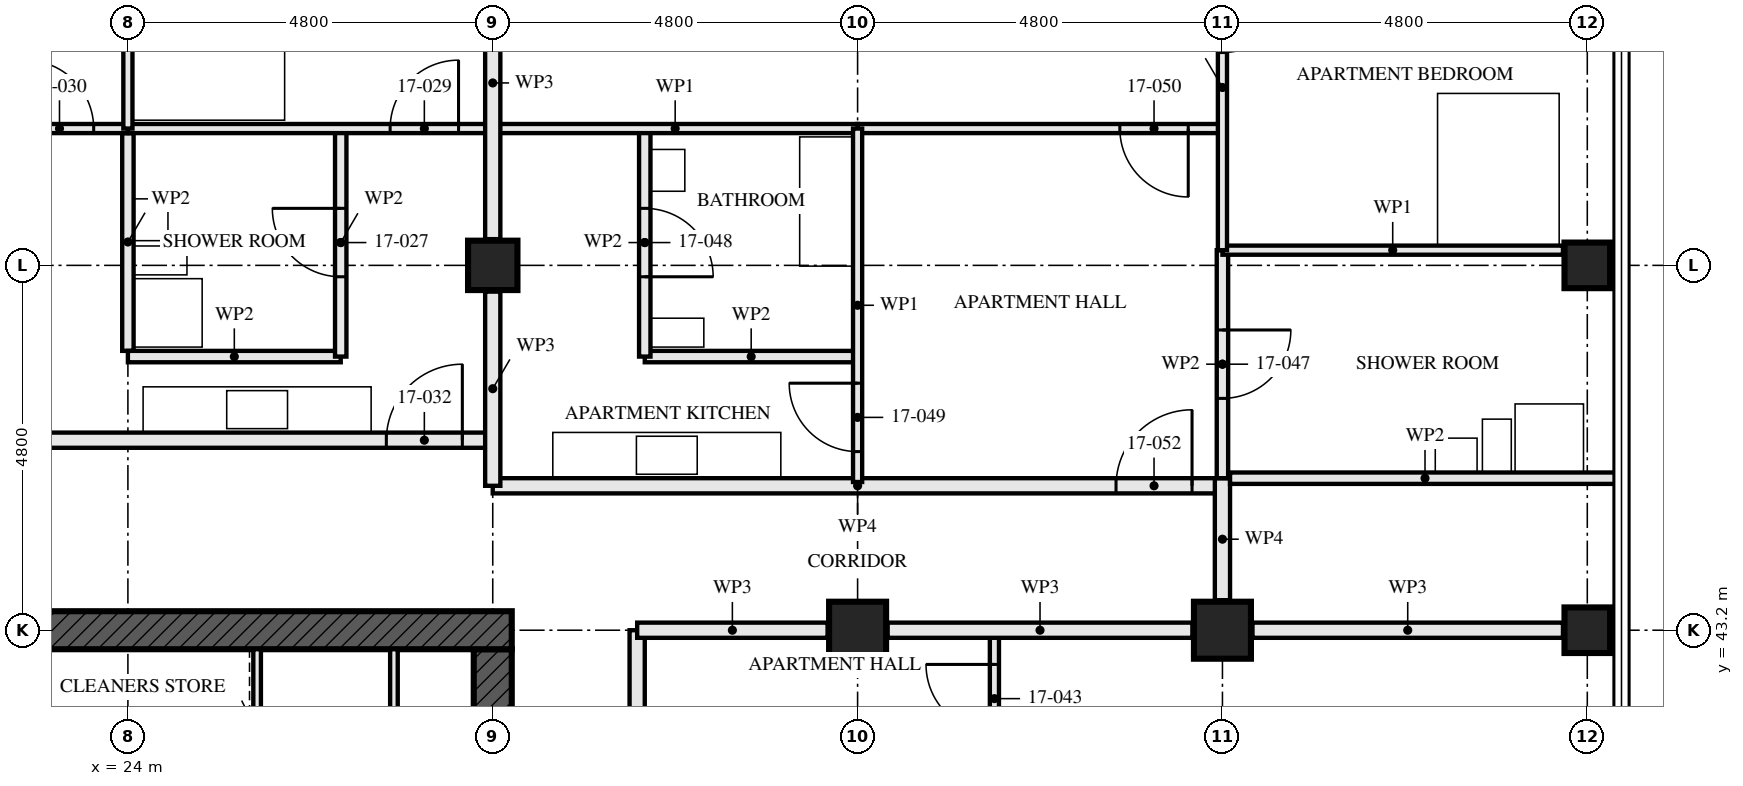
"""IFC4 building model, lengths in metres.
Left out: names, types, materials, properties, quantities, classifications, styles, units other than length and angle.
Written with IfcOpenShell. Run it as: python <this file> out.ifc"""

import sys

from ifc_helpers import new_model, si_unit, direction, frame, frame_2d, origin, origin_2d, place, context, subcontext, project, spatial, rectangle, hollow_rectangle, extrude, element, fill, save


model = new_model("IFC4")
c1 = context("Model", 3, precision=1e-05, world=origin(), true_north=direction((0.0, 1.0)))
c2 = subcontext(c1, "Body", "Model", "MODEL_VIEW")
j1 = project(units=[si_unit("LENGTHUNIT", "METRE"), si_unit("PLANEANGLEUNIT", "RADIAN")], contexts=[c1])
p1 = place(None, origin())
s1 = spatial("IfcSite", under=j1, at=p1, CompositionType="ELEMENT")
p2 = place(p1, origin())
s2 = spatial("IfcBuilding", under=s1, at=p2, CompositionType="ELEMENT")
p3 = place(p2, frame((0.0, 0.0, 65.5)))
s3 = spatial("IfcBuildingStorey", under=s2, at=p3, CompositionType="ELEMENT", Elevation=65.5)
p4 = place(p3, frame((28.8, 48.0, 0.0), z_axis=(0.0, 0.0, 1.0), x_axis=(1.0, 0.0, 0.0)))
e1 = element("IfcColumn", 1, at=p4, inside=s3, PredefinedType="COLUMN", context=c2, shape_type="SweptSolid", body=[
    extrude(hollow_rectangle(XDim=0.65, YDim=0.65, WallThickness=0.05, at=origin_2d()), origin(), (0.0, 0.0, 1.0), 3.5),
])
for number, where, z_axis, x_axis in (
    (2, (33.6, 43.2, 0.0), (0.0, 0.0, 1.0), (0.0, 1.0, 0.0)),
    (3, (38.4, 43.2, 0.0), (0.0, 0.0, 1.0), (0.0, 1.0, 0.0)),
):
    element("IfcColumn", number, at=place(p3, frame(where, z_axis=z_axis, x_axis=x_axis)), inside=s3, PredefinedType="COLUMN", context=c2, shape_type="SweptSolid", body=[
        extrude(hollow_rectangle(XDim=0.75, YDim=0.75, WallThickness=0.08, at=origin_2d()), origin(), (0.0, 0.0, 1.0), 3.5),
    ])
for number, where, z_axis, x_axis in (
    (4, (43.2, 43.2, 0.0), (0.0, 0.0, 1.0), (0.0, 1.0, 0.0)),
    (5, (43.2, 48.0, 0.0), (0.0, 0.0, 1.0), (1.0, 0.0, 0.0)),
):
    element("IfcColumn", number, at=place(p3, frame(where, z_axis=z_axis, x_axis=x_axis)), inside=s3, PredefinedType="COLUMN", context=c2, shape_type="SweptSolid", body=[
        extrude(hollow_rectangle(XDim=0.6, YDim=0.6, WallThickness=0.08, at=origin_2d()), origin(), (0.0, 0.0, 1.0), 3.5),
    ])
p5 = place(p3, frame((29.05, 43.2, -0.17), z_axis=(0.0, 0.0, 1.0), x_axis=(-1.0, 0.0, 0.0)))
e6 = element("IfcWall", 6, at=p5, inside=s3, PredefinedType="SHEAR", context=c2, shape_type="SweptSolid", body=[
    extrude(rectangle(XDim=14.9, YDim=0.5, at=frame_2d((7.45, 0.0))), origin(), (0.0, 0.0, 1.0), 3.5),
])
p6 = place(p5, frame((6.85, 0.0, 0.17)))
e7 = element("IfcOpeningElement", 7, at=p6, cuts=e6, PredefinedType="OPENING", context=c2, shape_type="SweptSolid", body=[
    extrude(rectangle(XDim=1.2, YDim=2.1, at=frame_2d((0.6, 1.05))), frame((0.0, 0.26, 0.0), z_axis=(0.0, -1.0, 0.0), x_axis=(1.0, 0.0, 0.0)), (0.0, 0.0, 1.0), 0.521),
])
p7 = place(p3, frame((28.8, 29.05, -0.17), z_axis=(0.0, 0.0, 1.0), x_axis=(0.0, 1.0, 0.0)))
e8 = element("IfcWall", 8, at=p7, inside=s3, PredefinedType="SHEAR", context=c2, shape_type="SweptSolid", body=[
    extrude(rectangle(XDim=13.9, YDim=0.5, at=frame_2d((6.95, 0.0))), origin(), (0.0, 0.0, 1.0), 3.5),
])
p8 = place(p7, frame((6.35, 0.0, 0.17)))
e9 = element("IfcOpeningElement", 9, at=p8, cuts=e8, PredefinedType="OPENING", context=c2, shape_type="SweptSolid", body=[
    extrude(rectangle(XDim=1.2, YDim=2.1, at=frame_2d((0.6, 1.05))), frame((0.0, 0.26, 0.0), z_axis=(0.0, -1.0, 0.0), x_axis=(1.0, 0.0, 0.0)), (0.0, 0.0, 1.0), 0.521),
])
p9 = place(p3, frame((26.8, 49.8, 0.0), z_axis=(0.0, 0.0, 1.0), x_axis=(0.0, -1.0, 0.0)))
e10 = element("IfcWall", 10, at=p9, inside=s3, PredefinedType="PARTITIONING", context=c2, shape_type="SweptSolid", body=[
    extrude(rectangle(XDim=3.0, YDim=0.15, at=frame_2d((1.5, 0.0))), origin(), (0.0, 0.0, 1.0), 2.55),
])
p10 = place(p9, frame((1.05, 0.0, 0.0)))
e11 = element("IfcOpeningElement", 11, at=p10, cuts=e10, PredefinedType="OPENING", context=c2, shape_type="SweptSolid", body=[
    extrude(rectangle(XDim=0.9, YDim=2.1, at=frame_2d((0.45, 1.05))), frame((0.0, 0.085, 0.0), z_axis=(0.0, -1.0, 0.0), x_axis=(1.0, 0.0, 0.0)), (0.0, 0.0, 1.0), 0.171),
])
p11 = place(p3, frame((26.8, 46.8, 0.0), z_axis=(0.0, 0.0, 1.0), x_axis=(-1.0, 0.0, 0.0)))
e12 = element("IfcWall", 12, at=p11, inside=s3, PredefinedType="PARTITIONING", context=c2, shape_type="SweptSolid", body=[
    extrude(rectangle(XDim=2.8, YDim=0.15, at=frame_2d((1.4, 0.0))), origin(), (0.0, 0.0, 1.0), 3.33),
])
p12 = place(p3, frame((28.8, 49.8, 0.0), z_axis=(0.0, 0.0, 1.0), x_axis=(-1.0, 0.0, 0.0)))
e13 = element("IfcWall", 13, at=p12, inside=s3, PredefinedType="PARTITIONING", context=c2, shape_type="SweptSolid", body=[
    extrude(rectangle(XDim=4.8, YDim=0.12, at=frame_2d((2.4, 0.0))), origin(), (0.0, 0.0, 1.0), 3.33),
])
p13 = place(p12, frame((0.45, 0.0, 0.0)))
e14 = element("IfcOpeningElement", 14, at=p13, cuts=e13, PredefinedType="OPENING", context=c2, shape_type="SweptSolid", body=[
    extrude(rectangle(XDim=0.9, YDim=2.1, at=frame_2d((0.45, 1.05))), frame((0.0, 0.071, 0.0), z_axis=(0.0, -1.0, 0.0), x_axis=(1.0, 0.0, 0.0)), (0.0, 0.0, 1.0), 0.141),
])
p14 = place(p3, frame((24.0, 49.8, 0.0), z_axis=(0.0, 0.0, 1.0), x_axis=(-1.0, 0.0, 0.0)))
e15 = element("IfcWall", 15, at=p14, inside=s3, PredefinedType="PARTITIONING", context=c2, shape_type="SweptSolid", body=[
    extrude(rectangle(XDim=4.8, YDim=0.12, at=frame_2d((2.4, 0.0))), origin(), (0.0, 0.0, 1.0), 3.33),
])
p15 = place(p14, frame((0.45, 0.0, 0.0)))
e16 = element("IfcOpeningElement", 16, at=p15, cuts=e15, PredefinedType="OPENING", context=c2, shape_type="SweptSolid", body=[
    extrude(rectangle(XDim=0.9, YDim=2.1, at=frame_2d((0.45, 1.05))), frame((0.0, 0.071, 0.0), z_axis=(0.0, -1.0, 0.0), x_axis=(1.0, 0.0, 0.0)), (0.0, 0.0, 1.0), 0.141),
])
p16 = place(p3, frame((24.0, 57.28, 0.0), z_axis=(0.0, 0.0, 1.0), x_axis=(0.0, -1.0, 0.0)))
e17 = element("IfcWall", 17, at=p16, inside=s3, PredefinedType="PARTITIONING", context=c2, shape_type="SweptSolid", body=[
    extrude(rectangle(XDim=7.48, YDim=0.12, at=frame_2d((3.74, 0.0))), origin(), (0.0, 0.0, 1.0), 2.55),
])
p17 = place(p3, frame((28.8, 45.7, 0.0), z_axis=(0.0, 0.0, 1.0), x_axis=(-1.0, 0.0, 0.0)))
e18 = element("IfcWall", 18, at=p17, inside=s3, PredefinedType="PARTITIONING", context=c2, shape_type="SweptSolid", body=[
    extrude(rectangle(XDim=14.4, YDim=0.2, at=frame_2d((7.2, 0.0))), origin(), (0.0, 0.0, 1.0), 3.33),
])
p18 = place(p17, frame((0.4, 0.0, 0.0)))
e19 = element("IfcOpeningElement", 19, at=p18, cuts=e18, PredefinedType="OPENING", context=c2, shape_type="SweptSolid", body=[
    extrude(rectangle(XDim=1.0, YDim=2.1, at=frame_2d((0.5, 1.05))), frame((0.0, 0.111, 0.0), z_axis=(0.0, -1.0, 0.0), x_axis=(1.0, 0.0, 0.0)), (0.0, 0.0, 1.0), 0.221),
])
p19 = place(p3, frame((35.4, 38.4, 0.0), z_axis=(0.0, 0.0, 1.0), x_axis=(0.0, 1.0, 0.0)))
e20 = element("IfcWall", 20, at=p19, inside=s3, PredefinedType="PARTITIONING", context=c2, shape_type="SweptSolid", body=[
    extrude(rectangle(XDim=4.8, YDim=0.12, at=frame_2d((2.4, 0.0))), origin(), (0.0, 0.0, 1.0), 3.33),
])
p20 = place(p19, frame((3.45, 0.0, 0.0)))
e21 = element("IfcOpeningElement", 21, at=p20, cuts=e20, PredefinedType="OPENING", context=c2, shape_type="SweptSolid", body=[
    extrude(rectangle(XDim=0.9, YDim=2.1, at=frame_2d((0.45, 1.05))), frame((0.0, 0.071, 0.0), z_axis=(0.0, -1.0, 0.0), x_axis=(1.0, 0.0, 0.0)), (0.0, 0.0, 1.0), 0.141),
])
p21 = place(p3, frame((30.7, 28.8, 0.0), z_axis=(0.0, 0.0, 1.0), x_axis=(0.0, 1.0, 0.0)))
e22 = element("IfcWall", 22, at=p21, inside=s3, PredefinedType="PARTITIONING", context=c2, shape_type="SweptSolid", body=[
    extrude(rectangle(XDim=14.4, YDim=0.2, at=frame_2d((7.2, 0.0))), origin(), (0.0, 0.0, 1.0), 2.55),
])
p22 = place(p21, frame((1.4, 0.0, 0.0)))
e23 = element("IfcOpeningElement", 23, at=p22, cuts=e22, PredefinedType="OPENING", context=c2, shape_type="SweptSolid", body=[
    extrude(rectangle(XDim=1.0, YDim=2.1, at=frame_2d((0.5, 1.05))), frame((0.0, 0.111, 0.0), z_axis=(0.0, -1.0, 0.0), x_axis=(1.0, 0.0, 0.0)), (0.0, 0.0, 1.0), 0.221),
])
p23 = place(p21, frame((4.1, 0.0, 0.0)))
e24 = element("IfcOpeningElement", 24, at=p23, cuts=e22, PredefinedType="OPENING", context=c2, shape_type="SweptSolid", body=[
    extrude(rectangle(XDim=1.0, YDim=2.1, at=frame_2d((0.5, 1.05))), frame((0.0, 0.111, 0.0), z_axis=(0.0, -1.0, 0.0), x_axis=(1.0, 0.0, 0.0)), (0.0, 0.0, 1.0), 0.221),
])
p24 = place(p21, frame((10.0, 0.0, 0.0)))
e25 = element("IfcOpeningElement", 25, at=p24, cuts=e22, PredefinedType="OPENING", context=c2, shape_type="SweptSolid", body=[
    extrude(rectangle(XDim=1.0, YDim=2.1, at=frame_2d((0.5, 1.05))), frame((0.0, 0.111, 0.0), z_axis=(0.0, -1.0, 0.0), x_axis=(1.0, 0.0, 0.0)), (0.0, 0.0, 1.0), 0.221),
])
p25 = place(p3, frame((38.4, 48.2, 0.0), z_axis=(0.0, 0.0, 1.0), x_axis=(0.0, -1.0, 0.0)))
e26 = element("IfcWall", 26, at=p25, inside=s3, PredefinedType="PARTITIONING", context=c2, shape_type="SweptSolid", body=[
    extrude(rectangle(XDim=3.0, YDim=0.15, at=frame_2d((1.5, 0.0))), origin(), (0.0, 0.0, 1.0), 2.55),
])
p26 = place(p25, frame((1.05, 0.0, 0.0)))
e27 = element("IfcOpeningElement", 27, at=p26, cuts=e26, PredefinedType="OPENING", context=c2, shape_type="SweptSolid", body=[
    extrude(rectangle(XDim=0.9, YDim=2.1, at=frame_2d((0.45, 1.05))), frame((0.0, 0.085, 0.0), z_axis=(0.0, -1.0, 0.0), x_axis=(1.0, 0.0, 0.0)), (0.0, 0.0, 1.0), 0.171),
])
p27 = place(p3, frame((30.8, 49.8, 0.0), z_axis=(0.0, 0.0, 1.0), x_axis=(0.0, -1.0, 0.0)))
e28 = element("IfcWall", 28, at=p27, inside=s3, PredefinedType="PARTITIONING", context=c2, shape_type="SweptSolid", body=[
    extrude(rectangle(XDim=3.0, YDim=0.15, at=frame_2d((1.5, 0.0))), origin(), (0.0, 0.0, 1.0), 2.55),
])
p28 = place(p27, frame((1.05, 0.0, 0.0)))
e29 = element("IfcOpeningElement", 29, at=p28, cuts=e28, PredefinedType="OPENING", context=c2, shape_type="SweptSolid", body=[
    extrude(rectangle(XDim=0.9, YDim=2.1, at=frame_2d((0.45, 1.05))), frame((0.0, 0.085, 0.0), z_axis=(0.0, -1.0, 0.0), x_axis=(1.0, 0.0, 0.0)), (0.0, 0.0, 1.0), 0.171),
])
p29 = place(p3, frame((33.6, 46.8, 0.0), z_axis=(0.0, 0.0, 1.0), x_axis=(-1.0, 0.0, 0.0)))
e30 = element("IfcWall", 30, at=p29, inside=s3, PredefinedType="PARTITIONING", context=c2, shape_type="SweptSolid", body=[
    extrude(rectangle(XDim=2.8, YDim=0.15, at=frame_2d((1.4, 0.0))), origin(), (0.0, 0.0, 1.0), 3.33),
])
p30 = place(p3, frame((33.6, 49.8, 0.0), z_axis=(0.0, 0.0, 1.0), x_axis=(0.0, -1.0, 0.0)))
e31 = element("IfcWall", 31, at=p30, inside=s3, PredefinedType="PARTITIONING", context=c2, shape_type="SweptSolid", body=[
    extrude(rectangle(XDim=4.65, YDim=0.12, at=frame_2d((2.325, 0.0))), origin(), (0.0, 0.0, 1.0), 2.55),
])
p31 = place(p30, frame((3.35, 0.0, 0.0)))
e32 = element("IfcOpeningElement", 32, at=p31, cuts=e31, PredefinedType="OPENING", context=c2, shape_type="SweptSolid", body=[
    extrude(rectangle(XDim=0.9, YDim=2.1, at=frame_2d((0.45, 1.05))), frame((0.0, 0.071, 0.0), z_axis=(0.0, -1.0, 0.0), x_axis=(1.0, 0.0, 0.0)), (0.0, 0.0, 1.0), 0.141),
])
p32 = place(p3, frame((42.88, 48.2, 0.0), z_axis=(0.0, 0.0, 1.0), x_axis=(-1.0, 0.0, 0.0)))
e33 = element("IfcWall", 33, at=p32, inside=s3, PredefinedType="PARTITIONING", context=c2, shape_type="SweptSolid", body=[
    extrude(rectangle(XDim=4.48, YDim=0.12, at=frame_2d((2.24, 0.0))), origin(), (0.0, 0.0, 1.0), 3.33),
])
p33 = place(p3, frame((38.4, 49.8, 0.0), z_axis=(0.0, 0.0, 1.0), x_axis=(-1.0, 0.0, 0.0)))
e34 = element("IfcWall", 34, at=p33, inside=s3, PredefinedType="PARTITIONING", context=c2, shape_type="SweptSolid", body=[
    extrude(rectangle(XDim=4.8, YDim=0.12, at=frame_2d((2.4, 0.0))), origin(), (0.0, 0.0, 1.0), 3.33),
])
p34 = place(p33, frame((0.45, 0.0, 0.0)))
e35 = element("IfcOpeningElement", 35, at=p34, cuts=e34, PredefinedType="OPENING", context=c2, shape_type="SweptSolid", body=[
    extrude(rectangle(XDim=0.9, YDim=2.1, at=frame_2d((0.45, 1.05))), frame((0.0, 0.071, 0.0), z_axis=(0.0, -1.0, 0.0), x_axis=(1.0, 0.0, 0.0)), (0.0, 0.0, 1.0), 0.141),
])
p35 = place(p3, frame((33.6, 49.8, 0.0), z_axis=(0.0, 0.0, 1.0), x_axis=(-1.0, 0.0, 0.0)))
e36 = element("IfcWall", 36, at=p35, inside=s3, PredefinedType="PARTITIONING", context=c2, shape_type="SweptSolid", body=[
    extrude(rectangle(XDim=4.8, YDim=0.12, at=frame_2d((2.4, 0.0))), origin(), (0.0, 0.0, 1.0), 3.33),
])
p36 = place(p3, frame((38.4, 52.48, 0.0), z_axis=(0.0, 0.0, 1.0), x_axis=(0.0, -1.0, 0.0)))
e37 = element("IfcWall", 37, at=p36, inside=s3, PredefinedType="PARTITIONING", context=c2, shape_type="SweptSolid", body=[
    extrude(rectangle(XDim=4.28, YDim=0.12, at=frame_2d((2.14, 0.0))), origin(), (0.0, 0.0, 1.0), 3.33),
])
p37 = place(p36, frame((0.78, 0.0, 0.0)))
e38 = element("IfcOpeningElement", 38, at=p37, cuts=e37, PredefinedType="OPENING", context=c2, shape_type="SweptSolid", body=[
    extrude(rectangle(XDim=0.9, YDim=2.1, at=frame_2d((0.45, 1.05))), frame((0.0, 0.071, 0.0), z_axis=(0.0, -1.0, 0.0), x_axis=(1.0, 0.0, 0.0)), (0.0, 0.0, 1.0), 0.141),
])
p38 = place(p3, frame((38.4, 45.1, 0.0), z_axis=(0.0, 0.0, 1.0), x_axis=(-1.0, 0.0, 0.0)))
e39 = element("IfcWall", 39, at=p38, inside=s3, PredefinedType="PARTITIONING", context=c2, shape_type="SweptSolid", body=[
    extrude(rectangle(XDim=9.6, YDim=0.2, at=frame_2d((4.8, 0.0))), origin(), (0.0, 0.0, 1.0), 3.33),
])
p39 = place(p38, frame((0.4, 0.0, 0.0)))
e40 = element("IfcOpeningElement", 40, at=p39, cuts=e39, PredefinedType="OPENING", context=c2, shape_type="SweptSolid", body=[
    extrude(rectangle(XDim=1.0, YDim=2.1, at=frame_2d((0.5, 1.05))), frame((0.0, 0.111, 0.0), z_axis=(0.0, -1.0, 0.0), x_axis=(1.0, 0.0, 0.0)), (0.0, 0.0, 1.0), 0.221),
])
p40 = place(p3, frame((38.4, 45.2, 0.0), z_axis=(0.0, 0.0, 1.0), x_axis=(0.0, -1.0, 0.0)))
e41 = element("IfcWall", 41, at=p40, inside=s3, PredefinedType="PARTITIONING", context=c2, shape_type="SweptSolid", body=[
    extrude(rectangle(XDim=1.605, YDim=0.2, at=frame_2d((0.802, 0.0))), origin(), (0.0, 0.0, 1.0), 3.33),
])
for number, where, z_axis, x_axis in (
    (42, (27.5, 37.15, 0.0), (0.0, 0.0, 1.0), (0.0, 1.0, 0.0)),
    (43, (25.7, 37.15, 0.0), (0.0, 0.0, 1.0), (0.0, 1.0, 0.0)),
):
    element("IfcWall", number, at=place(p3, frame(where, z_axis=z_axis, x_axis=x_axis)), inside=s3, PredefinedType="SOLIDWALL", context=c2, shape_type="SweptSolid", body=[
        extrude(rectangle(XDim=5.8, YDim=0.1, at=frame_2d((2.9, 0.0))), origin(), (0.0, 0.0, 1.0), 3.33),
    ])
p41 = place(p3, frame((28.8, 45.1, 0.0), z_axis=(0.0, 0.0, 1.0), x_axis=(0.0, 1.0, 0.0)))
e44 = element("IfcWall", 44, at=p41, inside=s3, PredefinedType="PARTITIONING", context=c2, shape_type="SweptSolid", body=[
    extrude(rectangle(XDim=2.555, YDim=0.2, at=frame_2d((1.277, 0.0))), origin(), (0.0, 0.0, 1.0), 2.32),
])
p42 = place(p3, frame((28.8, 48.345, 0.0), z_axis=(0.0, 0.0, 1.0), x_axis=(0.0, 1.0, 0.0)))
e45 = element("IfcWall", 45, at=p42, inside=s3, PredefinedType="PARTITIONING", context=c2, shape_type="SweptSolid", body=[
    extrude(rectangle(XDim=4.11, YDim=0.2, at=frame_2d((2.055, 0.0))), origin(), (0.0, 0.0, 1.0), 2.32),
])
p43 = place(p3, frame((42.88, 43.2, 0.0), z_axis=(0.0, 0.0, 1.0), x_axis=(-1.0, 0.0, 0.0)))
e46 = element("IfcWall", 46, at=p43, inside=s3, PredefinedType="PARTITIONING", context=c2, shape_type="SweptSolid", body=[
    extrude(rectangle(XDim=4.085, YDim=0.2, at=frame_2d((2.042, 0.0))), origin(), (0.0, 0.0, 1.0), 2.32),
])
p44 = place(p3, frame((38.005, 43.2, 0.0), z_axis=(0.0, 0.0, 1.0), x_axis=(-1.0, 0.0, 0.0)))
e47 = element("IfcWall", 47, at=p44, inside=s3, PredefinedType="PARTITIONING", context=c2, shape_type="SweptSolid", body=[
    extrude(rectangle(XDim=4.01, YDim=0.2, at=frame_2d((2.005, 0.0))), origin(), (0.0, 0.0, 1.0), 2.32),
])
p45 = place(p3, frame((33.205, 43.2, 0.0), z_axis=(0.0, 0.0, 1.0), x_axis=(-1.0, 0.0, 0.0)))
e48 = element("IfcWall", 48, at=p45, inside=s3, PredefinedType="PARTITIONING", context=c2, shape_type="SweptSolid", body=[
    extrude(rectangle(XDim=2.505, YDim=0.2, at=frame_2d((1.252, 0.0))), origin(), (0.0, 0.0, 1.0), 2.32),
])
p46 = place(p3, frame((24.0, 46.875, 0.0), z_axis=(0.0, 0.0, 1.0), x_axis=(0.0, 1.0, 0.0)))
e49 = element("IfcWall", 49, at=p46, inside=s3, PredefinedType="PARTITIONING", context=c2, shape_type="SweptSolid", body=[
    extrude(rectangle(XDim=2.865, YDim=0.15, at=frame_2d((1.433, 0.0))), origin(), (0.0, 0.0, 1.0), 2.55),
])
p47 = place(p3, frame((43.63, 45.2, 0.0), z_axis=(0.0, 0.0, 1.0), x_axis=(-1.0, 0.0, 0.0)))
e50 = element("IfcWall", 50, at=p47, inside=s3, PredefinedType="PARTITIONING", context=c2, shape_type="SweptSolid", body=[
    extrude(rectangle(XDim=5.13, YDim=0.15, at=frame_2d((2.565, 0.0))), origin(), (0.0, 0.0, 1.0), 2.32),
])
p48 = place(p10, frame((0.9, 0.0, 0.0), z_axis=(0.0, 0.0, 1.0), x_axis=(-1.0, 0.0, 0.0)))
e51 = element("IfcDoor", 51, at=p48, inside=s3, OperationType="SINGLE_SWING_LEFT", PredefinedType="DOOR", context=c2, shape_type="SweptSolid", body=[
    extrude(rectangle(XDim=0.9, YDim=2.1, at=frame_2d((0.45, 1.05))), frame((0.0, 0.022, 0.0), z_axis=(0.0, -1.0, 0.0), x_axis=(1.0, 0.0, 0.0)), (0.0, 0.0, 1.0), 0.044),
])
fill(e11, e51)
p49 = place(p13, frame((0.9, 0.0, 0.0), z_axis=(0.0, 0.0, 1.0), x_axis=(-1.0, 0.0, 0.0)))
e52 = element("IfcDoor", 52, at=p49, inside=s3, OperationType="SINGLE_SWING_LEFT", PredefinedType="DOOR", context=c2, shape_type="SweptSolid", body=[
    extrude(rectangle(XDim=0.9, YDim=2.1, at=frame_2d((0.45, 1.05))), frame((0.0, 0.022, 0.0), z_axis=(0.0, -1.0, 0.0), x_axis=(1.0, 0.0, 0.0)), (0.0, 0.0, 1.0), 0.044),
])
fill(e14, e52)
p50 = place(p15, frame((0.9, 0.0, 0.0), z_axis=(0.0, 0.0, 1.0), x_axis=(-1.0, 0.0, 0.0)))
e53 = element("IfcDoor", 53, at=p50, inside=s3, OperationType="SINGLE_SWING_RIGHT", PredefinedType="DOOR", context=c2, shape_type="SweptSolid", body=[
    extrude(rectangle(XDim=0.9, YDim=2.1, at=frame_2d((0.45, 1.05))), frame((0.0, 0.022, 0.0), z_axis=(0.0, -1.0, 0.0), x_axis=(1.0, 0.0, 0.0)), (0.0, 0.0, 1.0), 0.044),
])
fill(e16, e53)
p51 = place(p18, frame((1.0, 0.0, 0.0), z_axis=(0.0, 0.0, 1.0), x_axis=(-1.0, 0.0, 0.0)))
e54 = element("IfcDoor", 54, at=p51, inside=s3, OperationType="SINGLE_SWING_LEFT", PredefinedType="DOOR", context=c2, shape_type="SweptSolid", body=[
    extrude(rectangle(XDim=1.0, YDim=2.1, at=frame_2d((0.5, 1.05))), frame((0.0, 0.027, 0.0), z_axis=(0.0, -1.0, 0.0), x_axis=(1.0, 0.0, 0.0)), (0.0, 0.0, 1.0), 0.054),
])
fill(e19, e54)
p52 = place(p20, origin())
e55 = element("IfcDoor", 55, at=p52, inside=s3, OperationType="SINGLE_SWING_LEFT", PredefinedType="DOOR", context=c2, shape_type="SweptSolid", body=[
    extrude(rectangle(XDim=0.9, YDim=2.1, at=frame_2d((0.45, 1.05))), frame((0.0, 0.022, 0.0), z_axis=(0.0, -1.0, 0.0), x_axis=(1.0, 0.0, 0.0)), (0.0, 0.0, 1.0), 0.044),
])
fill(e21, e55)
p53 = place(p26, origin())
e56 = element("IfcDoor", 56, at=p53, inside=s3, OperationType="SINGLE_SWING_RIGHT", PredefinedType="DOOR", context=c2, shape_type="SweptSolid", body=[
    extrude(rectangle(XDim=0.9, YDim=2.1, at=frame_2d((0.45, 1.05))), frame((0.0, 0.022, 0.0), z_axis=(0.0, -1.0, 0.0), x_axis=(1.0, 0.0, 0.0)), (0.0, 0.0, 1.0), 0.044),
])
fill(e27, e56)
p54 = place(p28, origin())
e57 = element("IfcDoor", 57, at=p54, inside=s3, OperationType="SINGLE_SWING_LEFT", PredefinedType="DOOR", context=c2, shape_type="SweptSolid", body=[
    extrude(rectangle(XDim=0.9, YDim=2.1, at=frame_2d((0.45, 1.05))), frame((0.0, 0.022, 0.0), z_axis=(0.0, -1.0, 0.0), x_axis=(1.0, 0.0, 0.0)), (0.0, 0.0, 1.0), 0.044),
])
fill(e29, e57)
p55 = place(p31, frame((0.9, 0.0, 0.0), z_axis=(0.0, 0.0, 1.0), x_axis=(-1.0, 0.0, 0.0)))
e58 = element("IfcDoor", 58, at=p55, inside=s3, OperationType="SINGLE_SWING_LEFT", PredefinedType="DOOR", context=c2, shape_type="SweptSolid", body=[
    extrude(rectangle(XDim=0.9, YDim=2.1, at=frame_2d((0.45, 1.05))), frame((0.0, 0.022, 0.0), z_axis=(0.0, -1.0, 0.0), x_axis=(1.0, 0.0, 0.0)), (0.0, 0.0, 1.0), 0.044),
])
fill(e32, e58)
p56 = place(p34, origin())
e59 = element("IfcDoor", 59, at=p56, inside=s3, OperationType="SINGLE_SWING_RIGHT", PredefinedType="DOOR", context=c2, shape_type="SweptSolid", body=[
    extrude(rectangle(XDim=0.9, YDim=2.1, at=frame_2d((0.45, 1.05))), frame((0.0, 0.022, 0.0), z_axis=(0.0, -1.0, 0.0), x_axis=(1.0, 0.0, 0.0)), (0.0, 0.0, 1.0), 0.044),
])
fill(e35, e59)
p57 = place(p39, frame((1.0, 0.0, 0.0), z_axis=(0.0, 0.0, 1.0), x_axis=(-1.0, 0.0, 0.0)))
e60 = element("IfcDoor", 60, at=p57, inside=s3, OperationType="SINGLE_SWING_LEFT", PredefinedType="DOOR", context=c2, shape_type="SweptSolid", body=[
    extrude(rectangle(XDim=1.0, YDim=2.1, at=frame_2d((0.5, 1.05))), frame((0.0, 0.027, 0.0), z_axis=(0.0, -1.0, 0.0), x_axis=(1.0, 0.0, 0.0)), (0.0, 0.0, 1.0), 0.054),
])
fill(e40, e60)
save(model, sys.argv[1])
